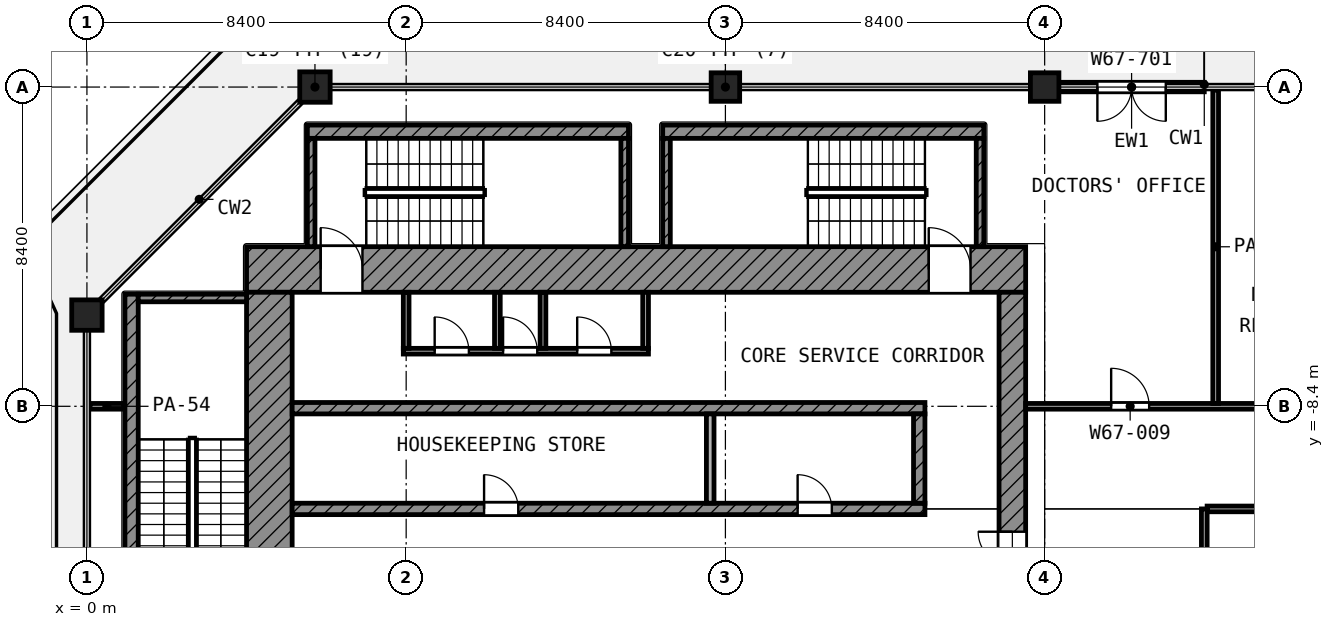
"""IFC4 building model, lengths in metres.
Left out: names, types, materials, properties, quantities, classifications, styles, units other than length and angle.
Written with IfcOpenShell. Run it as: python <this file> out.ifc"""

import sys

from ifc_helpers import new_model, si_unit, direction, frame, frame_2d, origin, origin_2d, place, context, subcontext, project, spatial, rectangle, extrude, element, fill, save


model = new_model("IFC4")
c1 = context("Model", 3, precision=1e-05, world=origin(), true_north=direction((0.0, 1.0)))
c2 = subcontext(c1, "Body", "Model", "MODEL_VIEW")
j1 = project(units=[si_unit("LENGTHUNIT", "METRE"), si_unit("PLANEANGLEUNIT", "RADIAN")], contexts=[c1])
p1 = place(None, origin())
s1 = spatial("IfcSite", under=j1, at=p1, CompositionType="ELEMENT")
p2 = place(p1, origin())
s2 = spatial("IfcBuilding", under=s1, at=p2, CompositionType="ELEMENT")
p3 = place(p2, frame((0.0, 0.0, 290.2)))
s3 = spatial("IfcBuildingStorey", under=s2, at=p3, CompositionType="ELEMENT", Elevation=290.2)
p4 = place(p3, frame((6.0, 0.0, 0.0), z_axis=(0.0, 0.0, 1.0), x_axis=(1.0, 0.0, 0.0)))
e1 = element("IfcColumn", 1, at=p4, inside=s3, PredefinedType="COLUMN", context=c2, shape_type="SweptSolid", body=[
    extrude(rectangle(XDim=0.8, YDim=0.8, at=origin_2d()), origin(), (0.0, 0.0, 1.0), 4.2),
])
for number, where, z_axis, x_axis in (
    (2, (16.8, 0.0, 0.0), (0.0, 0.0, 1.0), (1.0, 0.0, 0.0)),
    (3, (25.2, 0.0, 0.0), (0.0, 0.0, 1.0), (1.0, 0.0, 0.0)),
):
    element("IfcColumn", number, at=place(p3, frame(where, z_axis=z_axis, x_axis=x_axis)), inside=s3, PredefinedType="COLUMN", context=c2, shape_type="SweptSolid", body=[
        extrude(rectangle(XDim=0.75, YDim=0.75, at=origin_2d()), origin(), (0.0, 0.0, 1.0), 4.2),
    ])
p5 = place(p3, frame((0.0, -6.0, 0.0), z_axis=(0.0, 0.0, 1.0), x_axis=(1.0, 0.0, 0.0)))
e4 = element("IfcColumn", 4, at=p5, inside=s3, PredefinedType="COLUMN", context=c2, shape_type="SweptSolid", body=[
    extrude(rectangle(XDim=0.8, YDim=0.8, at=origin_2d()), origin(), (0.0, 0.0, 1.0), 4.2),
])
p6 = place(p3, frame((29.4, 0.0, 0.0), z_axis=(0.0, 0.0, 1.0), x_axis=(-1.0, 0.0, 0.0)))
e5 = element("IfcWall", 5, at=p6, inside=s3, PredefinedType="SOLIDWALL", context=c2, shape_type="SweptSolid", body=[
    extrude(rectangle(XDim=3.825, YDim=0.25, at=frame_2d((1.913, 0.0))), origin(), (0.0, 0.0, 1.0), 3.48),
])
p7 = place(p6, frame((1.012, 0.0, 0.0)))
e6 = element("IfcOpeningElement", 6, at=p7, cuts=e5, PredefinedType="OPENING", context=c2, shape_type="SweptSolid", body=[
    extrude(rectangle(XDim=1.8, YDim=2.1, at=frame_2d((0.9, 1.05))), frame((0.0, 0.135, 0.0), z_axis=(0.0, -1.0, 0.0), x_axis=(1.0, 0.0, 0.0)), (0.0, 0.0, 1.0), 0.27),
])
p8 = place(p3, frame((4.2, -4.8, 0.0), z_axis=(0.0, 0.0, 1.0), x_axis=(1.0, 0.0, 0.0)))
e7 = element("IfcWall", 7, at=p8, inside=s3, PredefinedType="SHEAR", context=c2, shape_type="SweptSolid", body=[
    extrude(rectangle(XDim=20.5, YDim=1.2, at=frame_2d((10.25, 0.0))), origin(), (0.0, 0.0, 1.0), 3.6),
])
p9 = place(p8, frame((1.95, 0.0, 0.0)))
e8 = element("IfcOpeningElement", 8, at=p9, cuts=e7, PredefinedType="OPENING", context=c2, shape_type="SweptSolid", body=[
    extrude(rectangle(XDim=1.1, YDim=2.1, at=frame_2d((0.55, 1.05))), frame((0.0, 0.61, 0.0), z_axis=(0.0, -1.0, 0.0), x_axis=(1.0, 0.0, 0.0)), (0.0, 0.0, 1.0), 1.22),
])
p10 = place(p8, frame((17.95, 0.0, 0.0)))
e9 = element("IfcOpeningElement", 9, at=p10, cuts=e7, PredefinedType="OPENING", context=c2, shape_type="SweptSolid", body=[
    extrude(rectangle(XDim=1.1, YDim=2.1, at=frame_2d((0.55, 1.05))), frame((0.0, 0.61, 0.0), z_axis=(0.0, -1.0, 0.0), x_axis=(1.0, 0.0, 0.0)), (0.0, 0.0, 1.0), 1.22),
])
p11 = place(p3, frame((4.8, -24.7, 0.0), z_axis=(0.0, 0.0, 1.0), x_axis=(0.0, 1.0, 0.0)))
e10 = element("IfcWall", 10, at=p11, inside=s3, PredefinedType="SHEAR", context=c2, shape_type="SweptSolid", body=[
    extrude(rectangle(XDim=19.3, YDim=1.2, at=frame_2d((9.65, 0.0))), origin(), (0.0, 0.0, 1.0), 3.6),
])
p12 = place(p11, frame((11.15, 0.0, 0.0)))
e11 = element("IfcOpeningElement", 11, at=p12, cuts=e10, PredefinedType="OPENING", context=c2, shape_type="SweptSolid", body=[
    extrude(rectangle(XDim=1.1, YDim=2.1, at=frame_2d((0.55, 1.05))), frame((0.0, 0.61, 0.0), z_axis=(0.0, -1.0, 0.0), x_axis=(1.0, 0.0, 0.0)), (0.0, 0.0, 1.0), 1.22),
])
p13 = place(p11, frame((1.85, 0.0, 0.0)))
e12 = element("IfcOpeningElement", 12, at=p13, cuts=e10, PredefinedType="OPENING", context=c2, shape_type="SweptSolid", body=[
    extrude(rectangle(XDim=1.1, YDim=2.1, at=frame_2d((0.55, 1.05))), frame((0.0, 0.61, 0.0), z_axis=(0.0, -1.0, 0.0), x_axis=(1.0, 0.0, 0.0)), (0.0, 0.0, 1.0), 1.22),
])
p14 = place(p3, frame((24.35, -24.0, 0.0), z_axis=(0.0, 0.0, 1.0), x_axis=(0.0, 1.0, 0.0)))
e13 = element("IfcWall", 13, at=p14, inside=s3, PredefinedType="SHEAR", context=c2, shape_type="SweptSolid", body=[
    extrude(rectangle(XDim=18.6, YDim=0.7, at=frame_2d((9.3, 0.0))), origin(), (0.0, 0.0, 1.0), 3.6),
])
p15 = place(p14, frame((10.5, 0.0, 0.0)))
e14 = element("IfcOpeningElement", 14, at=p15, cuts=e13, PredefinedType="OPENING", context=c2, shape_type="SweptSolid", body=[
    extrude(rectangle(XDim=1.8, YDim=2.1, at=frame_2d((0.9, 1.05))), frame((0.0, 0.36, 0.0), z_axis=(0.0, -1.0, 0.0), x_axis=(1.0, 0.0, 0.0)), (0.0, 0.0, 1.0), 0.72),
])
p16 = place(p3, frame((5.4, -8.45, 0.0), z_axis=(0.0, 0.0, 1.0), x_axis=(1.0, 0.0, 0.0)))
e15 = element("IfcWall", 15, at=p16, inside=s3, PredefinedType="SHEAR", context=c2, shape_type="SweptSolid", body=[
    extrude(rectangle(XDim=16.65, YDim=0.3, at=frame_2d((8.325, 0.0))), origin(), (0.0, 0.0, 1.0), 3.6),
])
p17 = place(p3, frame((5.4, -11.1, 0.0), z_axis=(0.0, 0.0, 1.0), x_axis=(1.0, 0.0, 0.0)))
e16 = element("IfcWall", 16, at=p17, inside=s3, PredefinedType="SHEAR", context=c2, shape_type="SweptSolid", body=[
    extrude(rectangle(XDim=16.65, YDim=0.3, at=frame_2d((8.325, 0.0))), origin(), (0.0, 0.0, 1.0), 3.6),
])
p18 = place(p17, frame((5.05, 0.0, 0.0)))
e17 = element("IfcOpeningElement", 17, at=p18, cuts=e16, PredefinedType="OPENING", context=c2, shape_type="SweptSolid", body=[
    extrude(rectangle(XDim=0.9, YDim=2.1, at=frame_2d((0.45, 1.05))), frame((0.0, 0.16, 0.0), z_axis=(0.0, -1.0, 0.0), x_axis=(1.0, 0.0, 0.0)), (0.0, 0.0, 1.0), 0.32),
])
p19 = place(p17, frame((13.3, 0.0, 0.0)))
e18 = element("IfcOpeningElement", 18, at=p19, cuts=e16, PredefinedType="OPENING", context=c2, shape_type="SweptSolid", body=[
    extrude(rectangle(XDim=0.9, YDim=2.1, at=frame_2d((0.45, 1.05))), frame((0.0, 0.16, 0.0), z_axis=(0.0, -1.0, 0.0), x_axis=(1.0, 0.0, 0.0)), (0.0, 0.0, 1.0), 0.32),
])
p20 = place(p3, frame((21.9, -10.95, 0.0), z_axis=(0.0, 0.0, 1.0), x_axis=(0.0, 1.0, 0.0)))
e19 = element("IfcWall", 19, at=p20, inside=s3, PredefinedType="SHEAR", context=c2, shape_type="SweptSolid", body=[
    extrude(rectangle(XDim=2.35, YDim=0.3, at=frame_2d((1.175, 0.0))), origin(), (0.0, 0.0, 1.0), 3.6),
])
p21 = place(p3, frame((16.4, -10.95, 0.0), z_axis=(0.0, 0.0, 1.0), x_axis=(0.0, 1.0, 0.0)))
e20 = element("IfcWall", 20, at=p21, inside=s3, PredefinedType="PARTITIONING", context=c2, shape_type="SweptSolid", body=[
    extrude(rectangle(XDim=2.35, YDim=0.2, at=frame_2d((1.175, 0.0))), origin(), (0.0, 0.0, 1.0), 3.6),
])
p22 = place(p3, frame((8.325, -6.95, 0.0), z_axis=(0.0, 0.0, 1.0), x_axis=(1.0, 0.0, 0.0)))
e21 = element("IfcWall", 21, at=p22, inside=s3, PredefinedType="PARTITIONING", context=c2, shape_type="SweptSolid", body=[
    extrude(rectangle(XDim=6.45, YDim=0.15, at=frame_2d((3.225, 0.0))), origin(), (0.0, 0.0, 1.0), 3.6),
])
p23 = place(p22, frame((0.825, 0.0, 0.0)))
e22 = element("IfcOpeningElement", 22, at=p23, cuts=e21, PredefinedType="OPENING", context=c2, shape_type="SweptSolid", body=[
    extrude(rectangle(XDim=0.9, YDim=2.1, at=frame_2d((0.45, 1.05))), frame((0.0, 0.085, 0.0), z_axis=(0.0, -1.0, 0.0), x_axis=(1.0, 0.0, 0.0)), (0.0, 0.0, 1.0), 0.17),
])
p24 = place(p22, frame((2.625, 0.0, 0.0)))
e23 = element("IfcOpeningElement", 23, at=p24, cuts=e21, PredefinedType="OPENING", context=c2, shape_type="SweptSolid", body=[
    extrude(rectangle(XDim=0.9, YDim=2.1, at=frame_2d((0.45, 1.05))), frame((0.0, 0.085, 0.0), z_axis=(0.0, -1.0, 0.0), x_axis=(1.0, 0.0, 0.0)), (0.0, 0.0, 1.0), 0.17),
])
p25 = place(p22, frame((4.575, 0.0, 0.0)))
e24 = element("IfcOpeningElement", 24, at=p25, cuts=e21, PredefinedType="OPENING", context=c2, shape_type="SweptSolid", body=[
    extrude(rectangle(XDim=0.9, YDim=2.1, at=frame_2d((0.45, 1.05))), frame((0.0, 0.085, 0.0), z_axis=(0.0, -1.0, 0.0), x_axis=(1.0, 0.0, 0.0)), (0.0, 0.0, 1.0), 0.17),
])
for number, where, z_axis, x_axis in (
    (25, (8.4, -6.875, 0.0), (0.0, 0.0, 1.0), (0.0, 1.0, 0.0)),
    (26, (10.8, -6.875, 0.0), (0.0, 0.0, 1.0), (0.0, 1.0, 0.0)),
    (27, (12.0, -6.875, 0.0), (0.0, 0.0, 1.0), (0.0, 1.0, 0.0)),
    (28, (14.7, -6.875, 0.0), (0.0, 0.0, 1.0), (0.0, 1.0, 0.0)),
):
    element("IfcWall", number, at=place(p3, frame(where, z_axis=z_axis, x_axis=x_axis)), inside=s3, PredefinedType="PARTITIONING", context=c2, shape_type="SweptSolid", body=[
        extrude(rectangle(XDim=1.475, YDim=0.15, at=frame_2d((0.738, 0.0))), origin(), (0.0, 0.0, 1.0), 3.6),
    ])
p26 = place(p3, frame((1.175, -13.9, 0.0), z_axis=(0.0, 0.0, 1.0), x_axis=(0.0, 1.0, 0.0)))
e29 = element("IfcWall", 29, at=p26, inside=s3, PredefinedType="SHEAR", context=c2, shape_type="SweptSolid", body=[
    extrude(rectangle(XDim=8.45, YDim=0.35, at=frame_2d((4.225, 0.0))), origin(), (0.0, 0.0, 1.0), 3.6),
])
p27 = place(p3, frame((1.35, -5.55, 0.0), z_axis=(0.0, 0.0, 1.0), x_axis=(1.0, 0.0, 0.0)))
e30 = element("IfcWall", 30, at=p27, inside=s3, PredefinedType="SHEAR", context=c2, shape_type="SweptSolid", body=[
    extrude(rectangle(XDim=2.85, YDim=0.2, at=frame_2d((1.425, 0.0))), origin(), (0.0, 0.0, 1.0), 3.6),
])
p28 = place(p3, frame((5.8, -1.175, 0.0), z_axis=(0.0, 0.0, 1.0), x_axis=(1.0, 0.0, 0.0)))
e31 = element("IfcWall", 31, at=p28, inside=s3, PredefinedType="SHEAR", context=c2, shape_type="SweptSolid", body=[
    extrude(rectangle(XDim=8.45, YDim=0.35, at=frame_2d((4.225, 0.0))), origin(), (0.0, 0.0, 1.0), 3.6),
])
for number, where, z_axis, x_axis in (
    (32, (5.9, -4.2, 0.0), (0.0, 0.0, 1.0), (0.0, 1.0, 0.0)),
    (33, (14.15, -4.2, 0.0), (0.0, 0.0, 1.0), (0.0, 1.0, 0.0)),
):
    element("IfcWall", number, at=place(p3, frame(where, z_axis=z_axis, x_axis=x_axis)), inside=s3, PredefinedType="SHEAR", context=c2, shape_type="SweptSolid", body=[
        extrude(rectangle(XDim=2.85, YDim=0.2, at=frame_2d((1.425, 0.0))), origin(), (0.0, 0.0, 1.0), 3.6),
    ])
p29 = place(p3, frame((15.15, -1.175, 0.0), z_axis=(0.0, 0.0, 1.0), x_axis=(1.0, 0.0, 0.0)))
e34 = element("IfcWall", 34, at=p29, inside=s3, PredefinedType="SHEAR", context=c2, shape_type="SweptSolid", body=[
    extrude(rectangle(XDim=8.45, YDim=0.35, at=frame_2d((4.225, 0.0))), origin(), (0.0, 0.0, 1.0), 3.6),
])
for number, where, z_axis, x_axis in (
    (35, (15.25, -4.2, 0.0), (0.0, 0.0, 1.0), (0.0, 1.0, 0.0)),
    (36, (23.5, -4.2, 0.0), (0.0, 0.0, 1.0), (0.0, 1.0, 0.0)),
):
    element("IfcWall", number, at=place(p3, frame(where, z_axis=z_axis, x_axis=x_axis)), inside=s3, PredefinedType="SHEAR", context=c2, shape_type="SweptSolid", body=[
        extrude(rectangle(XDim=2.85, YDim=0.2, at=frame_2d((1.425, 0.0))), origin(), (0.0, 0.0, 1.0), 3.6),
    ])
p30 = place(p3, frame((29.475, -11.1, 0.0), z_axis=(0.0, 0.0, 1.0), x_axis=(1.0, 0.0, 0.0)))
e37 = element("IfcWall", 37, at=p30, inside=s3, PredefinedType="PARTITIONING", context=c2, shape_type="SweptSolid", body=[
    extrude(rectangle(XDim=29.245, YDim=0.15, at=frame_2d((14.623, 0.0))), origin(), (0.0, 0.0, 1.0), 3.6),
])
p31 = place(p30, frame((3.525, 0.0, 0.0)))
e38 = element("IfcOpeningElement", 38, at=p31, cuts=e37, PredefinedType="OPENING", context=c2, shape_type="SweptSolid", body=[
    extrude(rectangle(XDim=1.2, YDim=2.1, at=frame_2d((0.6, 1.05))), frame((0.0, 0.085, 0.0), z_axis=(0.0, -1.0, 0.0), x_axis=(1.0, 0.0, 0.0)), (0.0, 0.0, 1.0), 0.17),
])
p32 = place(p30, frame((15.285, 0.0, 0.0)))
e39 = element("IfcOpeningElement", 39, at=p32, cuts=e37, PredefinedType="OPENING", context=c2, shape_type="SweptSolid", body=[
    extrude(rectangle(XDim=1.2, YDim=2.1, at=frame_2d((0.6, 1.05))), frame((0.0, 0.085, 0.0), z_axis=(0.0, -1.0, 0.0), x_axis=(1.0, 0.0, 0.0)), (0.0, 0.0, 1.0), 0.17),
])
p33 = place(p30, frame((13.745, 0.0, 0.0)))
e40 = element("IfcOpeningElement", 40, at=p33, cuts=e37, PredefinedType="OPENING", context=c2, shape_type="SweptSolid", body=[
    extrude(rectangle(XDim=1.2, YDim=2.1, at=frame_2d((0.6, 1.05))), frame((0.0, 0.085, 0.0), z_axis=(0.0, -1.0, 0.0), x_axis=(1.0, 0.0, 0.0)), (0.0, 0.0, 1.0), 0.17),
])
p34 = place(p30, frame((18.325, 0.0, 0.0)))
e41 = element("IfcOpeningElement", 41, at=p34, cuts=e37, PredefinedType="OPENING", context=c2, shape_type="SweptSolid", body=[
    extrude(rectangle(XDim=1.0, YDim=2.1, at=frame_2d((0.5, 1.05))), frame((0.0, 0.085, 0.0), z_axis=(0.0, -1.0, 0.0), x_axis=(1.0, 0.0, 0.0)), (0.0, 0.0, 1.0), 0.17),
])
p35 = place(p30, frame((24.375, 0.0, 0.0)))
e42 = element("IfcOpeningElement", 42, at=p35, cuts=e37, PredefinedType="OPENING", context=c2, shape_type="SweptSolid", body=[
    extrude(rectangle(XDim=1.5, YDim=2.1, at=frame_2d((0.75, 1.05))), frame((0.0, 0.085, 0.0), z_axis=(0.0, -1.0, 0.0), x_axis=(1.0, 0.0, 0.0)), (0.0, 0.0, 1.0), 0.17),
])
p36 = place(p3, frame((0.08, -8.4, 0.0), z_axis=(0.0, 0.0, 1.0), x_axis=(1.0, 0.0, 0.0)))
e43 = element("IfcWall", 43, at=p36, inside=s3, PredefinedType="PARTITIONING", context=c2, shape_type="SweptSolid", body=[
    extrude(rectangle(XDim=0.89, YDim=0.15, at=frame_2d((0.445, 0.0))), origin(), (0.0, 0.0, 1.0), 2.7),
])
p37 = place(p3, frame((24.7, -8.4, 0.0), z_axis=(0.0, 0.0, 1.0), x_axis=(1.0, 0.0, 0.0)))
e44 = element("IfcWall", 44, at=p37, inside=s3, PredefinedType="PARTITIONING", context=c2, shape_type="SweptSolid", body=[
    extrude(rectangle(XDim=15.582, YDim=0.15, at=frame_2d((7.791, 0.0))), origin(), (0.0, 0.0, 1.0), 3.6),
])
p38 = place(p37, frame((2.25, 0.0, 0.0)))
e45 = element("IfcOpeningElement", 45, at=p38, cuts=e44, PredefinedType="OPENING", context=c2, shape_type="SweptSolid", body=[
    extrude(rectangle(XDim=1.0, YDim=2.1, at=frame_2d((0.5, 1.05))), frame((0.0, 0.085, 0.0), z_axis=(0.0, -1.0, 0.0), x_axis=(1.0, 0.0, 0.0)), (0.0, 0.0, 1.0), 0.17),
])
p39 = place(p37, frame((6.55, 0.0, 0.0)))
e46 = element("IfcOpeningElement", 46, at=p39, cuts=e44, PredefinedType="OPENING", context=c2, shape_type="SweptSolid", body=[
    extrude(rectangle(XDim=1.2, YDim=2.1, at=frame_2d((0.6, 1.05))), frame((0.0, 0.085, 0.0), z_axis=(0.0, -1.0, 0.0), x_axis=(1.0, 0.0, 0.0)), (0.0, 0.0, 1.0), 0.17),
])
p40 = place(p37, frame((9.7, 0.0, 0.0)))
e47 = element("IfcOpeningElement", 47, at=p40, cuts=e44, PredefinedType="OPENING", context=c2, shape_type="SweptSolid", body=[
    extrude(rectangle(XDim=0.9, YDim=2.1, at=frame_2d((0.45, 1.05))), frame((0.0, 0.085, 0.0), z_axis=(0.0, -1.0, 0.0), x_axis=(1.0, 0.0, 0.0)), (0.0, 0.0, 1.0), 0.17),
])
p41 = place(p37, frame((11.55, 0.0, 0.0)))
e48 = element("IfcOpeningElement", 48, at=p41, cuts=e44, PredefinedType="OPENING", context=c2, shape_type="SweptSolid", body=[
    extrude(rectangle(XDim=1.0, YDim=2.1, at=frame_2d((0.5, 1.05))), frame((0.0, 0.085, 0.0), z_axis=(0.0, -1.0, 0.0), x_axis=(1.0, 0.0, 0.0)), (0.0, 0.0, 1.0), 0.17),
])
p42 = place(p3, frame((29.4, -31.198, 0.0), z_axis=(0.0, 0.0, 1.0), x_axis=(0.0, 1.0, 0.0)))
e49 = element("IfcWall", 49, at=p42, inside=s3, PredefinedType="PARTITIONING", context=c2, shape_type="SweptSolid", body=[
    extrude(rectangle(XDim=20.098, YDim=0.15, at=frame_2d((10.049, 0.0))), origin(), (0.0, 0.0, 1.0), 3.6),
])
p43 = place(p3, frame((29.7, -8.325, 0.0), z_axis=(0.0, 0.0, 1.0), x_axis=(0.0, 1.0, 0.0)))
e50 = element("IfcWall", 50, at=p43, inside=s3, PredefinedType="PARTITIONING", context=c2, shape_type="SweptSolid", body=[
    extrude(rectangle(XDim=8.245, YDim=0.15, at=frame_2d((4.123, 0.0))), origin(), (0.0, 0.0, 1.0), 3.6),
])
p44 = place(p7, origin())
e51 = element("IfcDoor", 51, at=p44, inside=s3, OperationType="DOUBLE_DOOR_SINGLE_SWING", PredefinedType="DOOR", context=c2, shape_type="SweptSolid", body=[
    extrude(rectangle(XDim=1.8, YDim=2.1, at=frame_2d((0.9, 1.05))), frame((0.0, 0.025, 0.0), z_axis=(0.0, -1.0, 0.0), x_axis=(1.0, 0.0, 0.0)), (0.0, 0.0, 1.0), 0.05),
])
fill(e6, e51)
p45 = place(p9, origin())
e52 = element("IfcDoor", 52, at=p45, inside=s3, OperationType="SINGLE_SWING_LEFT", PredefinedType="DOOR", context=c2, shape_type="SweptSolid", body=[
    extrude(rectangle(XDim=1.1, YDim=2.1, at=frame_2d((0.55, 1.05))), frame((0.0, 0.025, 0.0), z_axis=(0.0, -1.0, 0.0), x_axis=(1.0, 0.0, 0.0)), (0.0, 0.0, 1.0), 0.05),
])
fill(e8, e52)
p46 = place(p10, origin())
e53 = element("IfcDoor", 53, at=p46, inside=s3, OperationType="SINGLE_SWING_LEFT", PredefinedType="DOOR", context=c2, shape_type="SweptSolid", body=[
    extrude(rectangle(XDim=1.1, YDim=2.1, at=frame_2d((0.55, 1.05))), frame((0.0, 0.025, 0.0), z_axis=(0.0, -1.0, 0.0), x_axis=(1.0, 0.0, 0.0)), (0.0, 0.0, 1.0), 0.05),
])
fill(e9, e53)
p47 = place(p15, origin())
e54 = element("IfcDoor", 54, at=p47, inside=s3, OperationType="DOUBLE_DOOR_SINGLE_SWING", PredefinedType="DOOR", context=c2, shape_type="SweptSolid", body=[
    extrude(rectangle(XDim=1.8, YDim=2.1, at=frame_2d((0.9, 1.05))), frame((0.0, 0.025, 0.0), z_axis=(0.0, -1.0, 0.0), x_axis=(1.0, 0.0, 0.0)), (0.0, 0.0, 1.0), 0.05),
])
fill(e14, e54)
p48 = place(p23, origin())
e55 = element("IfcDoor", 55, at=p48, inside=s3, OperationType="SINGLE_SWING_LEFT", PredefinedType="DOOR", context=c2, shape_type="SweptSolid", body=[
    extrude(rectangle(XDim=0.9, YDim=2.1, at=frame_2d((0.45, 1.05))), frame((0.0, 0.025, 0.0), z_axis=(0.0, -1.0, 0.0), x_axis=(1.0, 0.0, 0.0)), (0.0, 0.0, 1.0), 0.05),
])
fill(e22, e55)
p49 = place(p24, origin())
e56 = element("IfcDoor", 56, at=p49, inside=s3, OperationType="SINGLE_SWING_LEFT", PredefinedType="DOOR", context=c2, shape_type="SweptSolid", body=[
    extrude(rectangle(XDim=0.9, YDim=2.1, at=frame_2d((0.45, 1.05))), frame((0.0, 0.025, 0.0), z_axis=(0.0, -1.0, 0.0), x_axis=(1.0, 0.0, 0.0)), (0.0, 0.0, 1.0), 0.05),
])
fill(e23, e56)
p50 = place(p25, origin())
e57 = element("IfcDoor", 57, at=p50, inside=s3, OperationType="SINGLE_SWING_LEFT", PredefinedType="DOOR", context=c2, shape_type="SweptSolid", body=[
    extrude(rectangle(XDim=0.9, YDim=2.1, at=frame_2d((0.45, 1.05))), frame((0.0, 0.025, 0.0), z_axis=(0.0, -1.0, 0.0), x_axis=(1.0, 0.0, 0.0)), (0.0, 0.0, 1.0), 0.05),
])
fill(e24, e57)
p51 = place(p18, origin())
e58 = element("IfcDoor", 58, at=p51, inside=s3, OperationType="SINGLE_SWING_LEFT", PredefinedType="DOOR", context=c2, shape_type="SweptSolid", body=[
    extrude(rectangle(XDim=0.9, YDim=2.1, at=frame_2d((0.45, 1.05))), frame((0.0, 0.025, 0.0), z_axis=(0.0, -1.0, 0.0), x_axis=(1.0, 0.0, 0.0)), (0.0, 0.0, 1.0), 0.05),
])
fill(e17, e58)
p52 = place(p19, origin())
e59 = element("IfcDoor", 59, at=p52, inside=s3, OperationType="SINGLE_SWING_LEFT", PredefinedType="DOOR", context=c2, shape_type="SweptSolid", body=[
    extrude(rectangle(XDim=0.9, YDim=2.1, at=frame_2d((0.45, 1.05))), frame((0.0, 0.025, 0.0), z_axis=(0.0, -1.0, 0.0), x_axis=(1.0, 0.0, 0.0)), (0.0, 0.0, 1.0), 0.05),
])
fill(e18, e59)
p53 = place(p38, origin())
e60 = element("IfcDoor", 60, at=p53, inside=s3, OperationType="SINGLE_SWING_LEFT", PredefinedType="DOOR", context=c2, shape_type="SweptSolid", body=[
    extrude(rectangle(XDim=1.0, YDim=2.1, at=frame_2d((0.5, 1.05))), frame((0.0, 0.025, 0.0), z_axis=(0.0, -1.0, 0.0), x_axis=(1.0, 0.0, 0.0)), (0.0, 0.0, 1.0), 0.05),
])
fill(e45, e60)
save(model, sys.argv[1])
